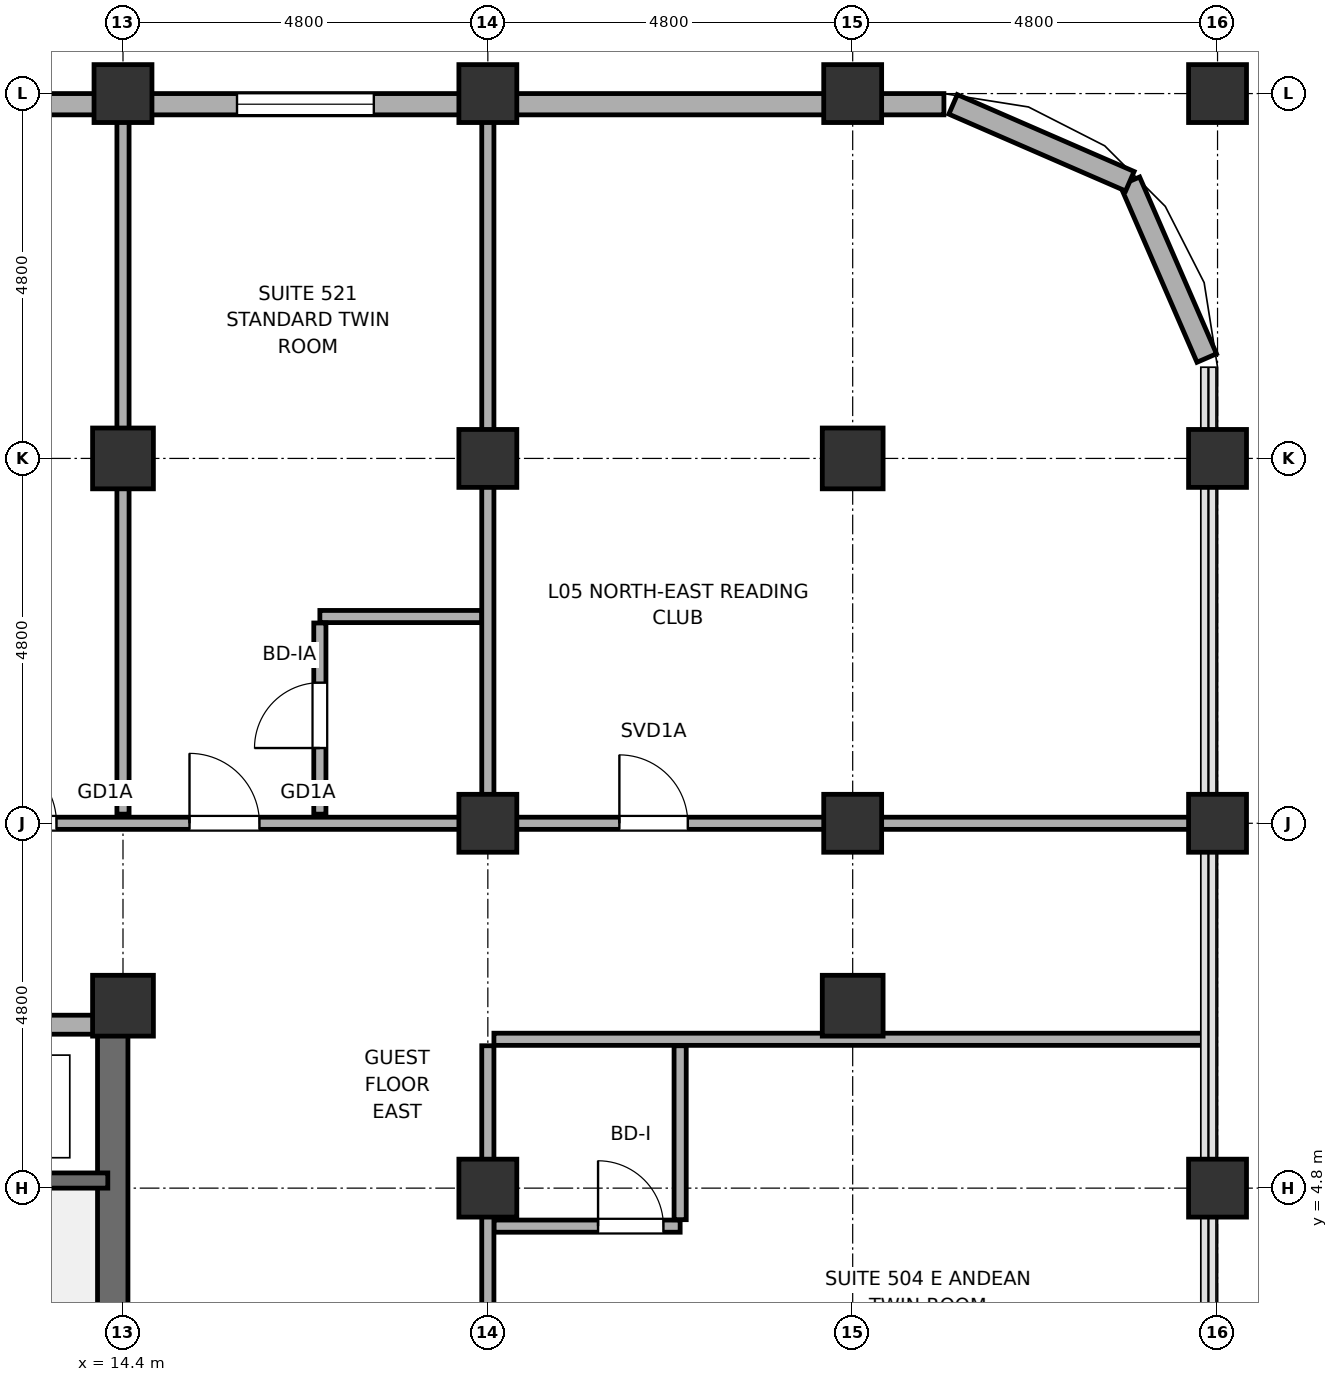
"""IFC4 building model, lengths in metres.
Left out: names, types, materials, properties, quantities, classifications, styles, units other than length and angle.
Written with IfcOpenShell. Run it as: python <this file> out.ifc"""

import sys

from ifc_helpers import new_model, si_unit, direction, frame, frame_2d, origin, origin_2d, place, context, subcontext, project, spatial, rectangle, hollow_rectangle, hollow_circle, extrude, element, fill, save


model = new_model("IFC4")
c1 = context("Model", 3, precision=1e-05, world=origin(), true_north=direction((0.0, 1.0)))
c2 = subcontext(c1, "Body", "Model", "MODEL_VIEW")
j1 = project(units=[si_unit("LENGTHUNIT", "METRE"), si_unit("PLANEANGLEUNIT", "RADIAN")], contexts=[c1])
p1 = place(None, origin())
s1 = spatial("IfcSite", under=j1, at=p1, CompositionType="ELEMENT")
p2 = place(p1, origin())
s2 = spatial("IfcBuilding", under=s1, at=p2, CompositionType="ELEMENT")
p3 = place(p2, frame((0.0, 0.0, 30.0)))
s3 = spatial("IfcBuildingStorey", under=s2, at=p3, CompositionType="ELEMENT", Elevation=30.0)
for number, where, z_axis, x_axis in (
    (1, (14.4, 7.2, 0.0), (0.0, 0.0, 1.0), (1.0, 0.0, 0.0)),
    (2, (14.4, 14.4, 0.0), (0.0, 0.0, 1.0), (1.0, 0.0, 0.0)),
):
    element("IfcColumn", number, at=place(p3, frame(where, z_axis=z_axis, x_axis=x_axis)), inside=s3, PredefinedType="COLUMN", context=c2, shape_type="SweptSolid", body=[
        extrude(hollow_rectangle(XDim=0.8, YDim=0.8, WallThickness=0.036, at=origin_2d()), origin(), (0.0, 0.0, 1.0), 3.7),
    ])
for number, where, z_axis, x_axis in (
    (3, (14.4, 19.2, 0.0), (0.0, 0.0, 1.0), (1.0, 0.0, 0.0)),
    (4, (19.2, 4.8, 0.0), (0.0, 0.0, 1.0), (1.0, 0.0, 0.0)),
    (5, (19.2, 9.6, 0.0), (0.0, 0.0, 1.0), (1.0, 0.0, 0.0)),
    (6, (19.2, 14.4, 0.0), (0.0, 0.0, 1.0), (1.0, 0.0, 0.0)),
    (7, (19.2, 19.2, 0.0), (0.0, 0.0, 1.0), (1.0, 0.0, 0.0)),
):
    element("IfcColumn", number, at=place(p3, frame(where, z_axis=z_axis, x_axis=x_axis)), inside=s3, PredefinedType="COLUMN", context=c2, shape_type="SweptSolid", body=[
        extrude(hollow_circle(Radius=0.381, WallThickness=0.032, at=origin_2d()), origin(), (0.0, 0.0, 1.0), 3.7),
    ])
p4 = place(p3, frame((24.0, 7.2, 0.0), z_axis=(0.0, 0.0, 1.0), x_axis=(1.0, 0.0, 0.0)))
e8 = element("IfcColumn", 8, at=p4, inside=s3, PredefinedType="COLUMN", context=c2, shape_type="SweptSolid", body=[
    extrude(hollow_rectangle(XDim=0.8, YDim=0.8, WallThickness=0.036, at=origin_2d()), origin(), (0.0, 0.0, 1.0), 3.7),
])
p5 = place(p3, frame((24.0, 9.6, 0.0), z_axis=(0.0, 0.0, 1.0), x_axis=(1.0, 0.0, 0.0)))
e9 = element("IfcColumn", 9, at=p5, inside=s3, PredefinedType="COLUMN", context=c2, shape_type="SweptSolid", body=[
    extrude(hollow_circle(Radius=0.381, WallThickness=0.032, at=origin_2d()), origin(), (0.0, 0.0, 1.0), 3.7),
])
p6 = place(p3, frame((24.0, 14.4, 0.0), z_axis=(0.0, 0.0, 1.0), x_axis=(1.0, 0.0, 0.0)))
e10 = element("IfcColumn", 10, at=p6, inside=s3, PredefinedType="COLUMN", context=c2, shape_type="SweptSolid", body=[
    extrude(hollow_rectangle(XDim=0.8, YDim=0.8, WallThickness=0.036, at=origin_2d()), origin(), (0.0, 0.0, 1.0), 3.7),
])
for number, where, z_axis, x_axis in (
    (11, (24.0, 19.2, 0.0), (0.0, 0.0, 1.0), (1.0, 0.0, 0.0)),
    (12, (28.8, 4.8, 0.0), (0.0, 0.0, 1.0), (1.0, 0.0, 0.0)),
    (13, (28.8, 9.6, 0.0), (0.0, 0.0, 1.0), (1.0, 0.0, 0.0)),
    (14, (28.8, 14.4, 0.0), (0.0, 0.0, 1.0), (1.0, 0.0, 0.0)),
    (15, (28.8, 19.2, 0.0), (0.0, 0.0, 1.0), (1.0, 0.0, 0.0)),
):
    element("IfcColumn", number, at=place(p3, frame(where, z_axis=z_axis, x_axis=x_axis)), inside=s3, PredefinedType="COLUMN", context=c2, shape_type="SweptSolid", body=[
        extrude(hollow_circle(Radius=0.381, WallThickness=0.032, at=origin_2d()), origin(), (0.0, 0.0, 1.0), 3.7),
    ])
p7 = place(p3, frame((14.265, -7.2, -0.18), z_axis=(0.0, 0.0, 1.0), x_axis=(0.0, 1.0, 0.0)))
e16 = element("IfcWall", 16, at=p7, inside=s3, PredefinedType="SHEAR", context=c2, shape_type="SweptSolid", body=[
    extrude(rectangle(XDim=14.4, YDim=0.4, at=frame_2d((7.2, 0.0))), origin(), (0.0, 0.0, 1.0), 3.7),
])
p8 = place(p3, frame((28.658, 15.721, 0.0), z_axis=(0.0, 0.0, 1.0), x_axis=(-0.398792985289, 0.917040977756, 0.0)))
e17 = element("IfcWall", 17, at=p8, inside=s3, PredefinedType="SOLIDWALL", context=c2, shape_type="SweptSolid", body=[
    extrude(rectangle(XDim=2.536, YDim=0.28, at=frame_2d((1.268, 0.0))), origin(), (0.0, 0.0, 1.0), 2.82),
])
p9 = place(p3, frame((27.646, 18.047, 0.0), z_axis=(0.0, 0.0, 1.0), x_axis=(-0.917060872934, 0.398747232384, 0.0)))
e18 = element("IfcWall", 18, at=p9, inside=s3, PredefinedType="SOLIDWALL", context=c2, shape_type="SweptSolid", body=[
    extrude(rectangle(XDim=2.536, YDim=0.28, at=frame_2d((1.268, 0.0))), origin(), (0.0, 0.0, 1.0), 2.12),
])
p10 = place(p3, frame((4.75, 19.06, 0.0), z_axis=(0.0, 0.0, 1.0), x_axis=(1.0, 0.0, 0.0)))
e19 = element("IfcWall", 19, at=p10, inside=s3, PredefinedType="SOLIDWALL", context=c2, shape_type="SweptSolid", body=[
    extrude(rectangle(XDim=20.45, YDim=0.28, at=frame_2d((10.225, 0.0))), origin(), (0.0, 0.0, 1.0), 2.12),
])
p11 = place(p10, frame((1.55, 0.0, 0.75)))
e20 = element("IfcOpeningElement", 20, at=p11, cuts=e19, PredefinedType="OPENING", context=c2, shape_type="SweptSolid", body=[
    extrude(rectangle(XDim=1.8, YDim=1.15, at=frame_2d((0.9, 0.575))), frame((0.0, 0.155, 0.0), z_axis=(0.0, -1.0, 0.0), x_axis=(1.0, 0.0, 0.0)), (0.0, 0.0, 1.0), 0.31),
])
p12 = place(p10, frame((6.35, 0.0, 0.75)))
e21 = element("IfcOpeningElement", 21, at=p12, cuts=e19, PredefinedType="OPENING", context=c2, shape_type="SweptSolid", body=[
    extrude(rectangle(XDim=1.8, YDim=1.15, at=frame_2d((0.9, 0.575))), frame((0.0, 0.155, 0.0), z_axis=(0.0, -1.0, 0.0), x_axis=(1.0, 0.0, 0.0)), (0.0, 0.0, 1.0), 0.31),
])
p13 = place(p10, frame((11.15, 0.0, 0.75)))
e22 = element("IfcOpeningElement", 22, at=p13, cuts=e19, PredefinedType="OPENING", context=c2, shape_type="SweptSolid", body=[
    extrude(rectangle(XDim=1.8, YDim=1.15, at=frame_2d((0.9, 0.575))), frame((0.0, 0.155, 0.0), z_axis=(0.0, -1.0, 0.0), x_axis=(1.0, 0.0, 0.0)), (0.0, 0.0, 1.0), 0.31),
])
p14 = place(p3, frame((4.8, 6.95, 0.0), z_axis=(0.0, 0.0, 1.0), x_axis=(1.0, 0.0, 0.0)))
e23 = element("IfcWall", 23, at=p14, inside=s3, PredefinedType="SOLIDWALL", context=c2, shape_type="SweptSolid", body=[
    extrude(rectangle(XDim=9.4, YDim=0.25, at=frame_2d((4.7, 0.0))), origin(), (0.0, 0.0, 1.0), 2.12),
])
p15 = place(p14, frame((3.5, 0.0, 0.0)))
e24 = element("IfcOpeningElement", 24, at=p15, cuts=e23, PredefinedType="OPENING", context=c2, shape_type="SweptSolid", body=[
    extrude(rectangle(XDim=1.2, YDim=2.02, at=frame_2d((0.6, 1.01))), frame((0.0, 0.14, 0.0), z_axis=(0.0, -1.0, 0.0), x_axis=(1.0, 0.0, 0.0)), (0.0, 0.0, 1.0), 0.28),
])
p16 = place(p3, frame((10.55, 4.9, -0.18), z_axis=(0.0, 0.0, 1.0), x_axis=(1.0, 0.0, 0.0)))
e25 = element("IfcWall", 25, at=p16, inside=s3, PredefinedType="SOLIDWALL", context=c2, shape_type="SweptSolid", body=[
    extrude(rectangle(XDim=3.65, YDim=0.2, at=frame_2d((1.825, 0.0))), origin(), (0.0, 0.0, 1.0), 3.7),
])
p17 = place(p3, frame((19.28, 4.3, 0.0), z_axis=(0.0, 0.0, 1.0), x_axis=(1.0, 0.0, 0.0)))
e26 = element("IfcWall", 26, at=p17, inside=s3, PredefinedType="PARTITIONING", context=c2, shape_type="SweptSolid", body=[
    extrude(rectangle(XDim=2.45, YDim=0.16, at=frame_2d((1.225, 0.0))), origin(), (0.0, 0.0, 1.0), 2.82),
])
p18 = place(p17, frame((1.37, 0.0, 0.0)))
e27 = element("IfcOpeningElement", 27, at=p18, cuts=e26, PredefinedType="OPENING", context=c2, shape_type="SweptSolid", body=[
    extrude(rectangle(XDim=0.86, YDim=2.1, at=frame_2d((0.43, 1.05))), frame((0.0, 0.095, 0.0), z_axis=(0.0, -1.0, 0.0), x_axis=(1.0, 0.0, 0.0)), (0.0, 0.0, 1.0), 0.19),
])
p19 = place(p3, frame((19.28, 6.758, 0.0), z_axis=(0.0, 0.0, 1.0), x_axis=(1.0, 0.0, 0.0)))
e28 = element("IfcWall", 28, at=p19, inside=s3, PredefinedType="PARTITIONING", context=c2, shape_type="SweptSolid", body=[
    extrude(rectangle(XDim=9.35, YDim=0.16, at=frame_2d((4.675, 0.0))), origin(), (0.0, 0.0, 1.0), 2.12),
])
p20 = place(p3, frame((-33.43, 9.6, 0.0), z_axis=(0.0, 0.0, 1.0), x_axis=(1.0, 0.0, 0.0)))
e29 = element("IfcWall", 29, at=p20, inside=s3, PredefinedType="PARTITIONING", context=c2, shape_type="SweptSolid", body=[
    extrude(rectangle(XDim=62.06, YDim=0.16, at=frame_2d((31.03, 0.0))), origin(), (0.0, 0.0, 1.0), 2.12),
])
p21 = place(p20, frame((6.8, 0.0, 0.0)))
e30 = element("IfcOpeningElement", 30, at=p21, cuts=e29, PredefinedType="OPENING", context=c2, shape_type="SweptSolid", body=[
    extrude(rectangle(XDim=0.9, YDim=2.02, at=frame_2d((0.45, 1.01))), frame((0.0, 0.095, 0.0), z_axis=(0.0, -1.0, 0.0), x_axis=(1.0, 0.0, 0.0)), (0.0, 0.0, 1.0), 0.19),
])
p22 = place(p20, frame((54.361, 0.0, 0.0)))
e31 = element("IfcOpeningElement", 31, at=p22, cuts=e29, PredefinedType="OPENING", context=c2, shape_type="SweptSolid", body=[
    extrude(rectangle(XDim=0.9, YDim=2.02, at=frame_2d((0.45, 1.01))), frame((0.0, 0.095, 0.0), z_axis=(0.0, -1.0, 0.0), x_axis=(1.0, 0.0, 0.0)), (0.0, 0.0, 1.0), 0.19),
])
p23 = place(p20, frame((10.69, 0.0, 0.0)))
e32 = element("IfcOpeningElement", 32, at=p23, cuts=e29, PredefinedType="OPENING", context=c2, shape_type="SweptSolid", body=[
    extrude(rectangle(XDim=0.9, YDim=2.02, at=frame_2d((0.45, 1.01))), frame((0.0, 0.095, 0.0), z_axis=(0.0, -1.0, 0.0), x_axis=(1.0, 0.0, 0.0)), (0.0, 0.0, 1.0), 0.19),
])
p24 = place(p20, frame((12.07, 0.0, 0.0)))
e33 = element("IfcOpeningElement", 33, at=p24, cuts=e29, PredefinedType="OPENING", context=c2, shape_type="SweptSolid", body=[
    extrude(rectangle(XDim=0.9, YDim=2.02, at=frame_2d((0.45, 1.01))), frame((0.0, 0.095, 0.0), z_axis=(0.0, -1.0, 0.0), x_axis=(1.0, 0.0, 0.0)), (0.0, 0.0, 1.0), 0.19),
])
p25 = place(p20, frame((17.235, 0.0, 0.0)))
e34 = element("IfcOpeningElement", 34, at=p25, cuts=e29, PredefinedType="OPENING", context=c2, shape_type="SweptSolid", body=[
    extrude(rectangle(XDim=0.92, YDim=2.02, at=frame_2d((0.46, 1.01))), frame((0.0, 0.095, 0.0), z_axis=(0.0, -1.0, 0.0), x_axis=(1.0, 0.0, 0.0)), (0.0, 0.0, 1.0), 0.19),
])
p26 = place(p20, frame((19.905, 0.0, 0.0)))
e35 = element("IfcOpeningElement", 35, at=p26, cuts=e29, PredefinedType="OPENING", context=c2, shape_type="SweptSolid", body=[
    extrude(rectangle(XDim=0.92, YDim=2.02, at=frame_2d((0.46, 1.01))), frame((0.0, 0.095, 0.0), z_axis=(0.0, -1.0, 0.0), x_axis=(1.0, 0.0, 0.0)), (0.0, 0.0, 1.0), 0.19),
])
p27 = place(p20, frame((26.835, 0.0, 0.0)))
e36 = element("IfcOpeningElement", 36, at=p27, cuts=e29, PredefinedType="OPENING", context=c2, shape_type="SweptSolid", body=[
    extrude(rectangle(XDim=0.92, YDim=2.02, at=frame_2d((0.46, 1.01))), frame((0.0, 0.095, 0.0), z_axis=(0.0, -1.0, 0.0), x_axis=(1.0, 0.0, 0.0)), (0.0, 0.0, 1.0), 0.19),
])
p28 = place(p20, frame((29.505, 0.0, 0.0)))
e37 = element("IfcOpeningElement", 37, at=p28, cuts=e29, PredefinedType="OPENING", context=c2, shape_type="SweptSolid", body=[
    extrude(rectangle(XDim=0.92, YDim=2.02, at=frame_2d((0.46, 1.01))), frame((0.0, 0.095, 0.0), z_axis=(0.0, -1.0, 0.0), x_axis=(1.0, 0.0, 0.0)), (0.0, 0.0, 1.0), 0.19),
])
p29 = place(p20, frame((36.435, 0.0, 0.0)))
e38 = element("IfcOpeningElement", 38, at=p29, cuts=e29, PredefinedType="OPENING", context=c2, shape_type="SweptSolid", body=[
    extrude(rectangle(XDim=0.92, YDim=2.02, at=frame_2d((0.46, 1.01))), frame((0.0, 0.095, 0.0), z_axis=(0.0, -1.0, 0.0), x_axis=(1.0, 0.0, 0.0)), (0.0, 0.0, 1.0), 0.19),
])
p30 = place(p20, frame((39.105, 0.0, 0.0)))
e39 = element("IfcOpeningElement", 39, at=p30, cuts=e29, PredefinedType="OPENING", context=c2, shape_type="SweptSolid", body=[
    extrude(rectangle(XDim=0.92, YDim=2.02, at=frame_2d((0.46, 1.01))), frame((0.0, 0.095, 0.0), z_axis=(0.0, -1.0, 0.0), x_axis=(1.0, 0.0, 0.0)), (0.0, 0.0, 1.0), 0.19),
])
p31 = place(p20, frame((46.035, 0.0, 0.0)))
e40 = element("IfcOpeningElement", 40, at=p31, cuts=e29, PredefinedType="OPENING", context=c2, shape_type="SweptSolid", body=[
    extrude(rectangle(XDim=0.92, YDim=2.02, at=frame_2d((0.46, 1.01))), frame((0.0, 0.095, 0.0), z_axis=(0.0, -1.0, 0.0), x_axis=(1.0, 0.0, 0.0)), (0.0, 0.0, 1.0), 0.19),
])
p32 = place(p20, frame((48.705, 0.0, 0.0)))
e41 = element("IfcOpeningElement", 41, at=p32, cuts=e29, PredefinedType="OPENING", context=c2, shape_type="SweptSolid", body=[
    extrude(rectangle(XDim=0.92, YDim=2.02, at=frame_2d((0.46, 1.01))), frame((0.0, 0.095, 0.0), z_axis=(0.0, -1.0, 0.0), x_axis=(1.0, 0.0, 0.0)), (0.0, 0.0, 1.0), 0.19),
])
p33 = place(p3, frame((16.99, 12.32, 0.0), z_axis=(0.0, 0.0, 1.0), x_axis=(1.0, 0.0, 0.0)))
e42 = element("IfcWall", 42, at=p33, inside=s3, PredefinedType="PARTITIONING", context=c2, shape_type="SweptSolid", body=[
    extrude(rectangle(XDim=2.13, YDim=0.16, at=frame_2d((1.065, 0.0))), origin(), (0.0, 0.0, 1.0), 2.82),
])
p34 = place(p3, frame((14.4, 9.72, 0.0), z_axis=(0.0, 0.0, 1.0), x_axis=(0.0, 1.0, 0.0)))
e43 = element("IfcWall", 43, at=p34, inside=s3, PredefinedType="PARTITIONING", context=c2, shape_type="SweptSolid", body=[
    extrude(rectangle(XDim=9.19, YDim=0.16, at=frame_2d((4.595, 0.0))), origin(), (0.0, 0.0, 1.0), 2.12),
])
p35 = place(p3, frame((16.99, 9.72, 0.0), z_axis=(0.0, 0.0, 1.0), x_axis=(0.0, 1.0, 0.0)))
e44 = element("IfcWall", 44, at=p35, inside=s3, PredefinedType="PARTITIONING", context=c2, shape_type="SweptSolid", body=[
    extrude(rectangle(XDim=2.515, YDim=0.16, at=frame_2d((1.258, 0.0))), origin(), (0.0, 0.0, 1.0), 2.12),
])
p36 = place(p35, frame((0.87, 0.0, 0.0)))
e45 = element("IfcOpeningElement", 45, at=p36, cuts=e44, PredefinedType="OPENING", context=c2, shape_type="SweptSolid", body=[
    extrude(rectangle(XDim=0.86, YDim=2.02, at=frame_2d((0.43, 1.01))), frame((0.0, 0.095, 0.0), z_axis=(0.0, -1.0, 0.0), x_axis=(1.0, 0.0, 0.0)), (0.0, 0.0, 1.0), 0.19),
])
p37 = place(p3, frame((19.2, -6.715, 0.0), z_axis=(0.0, 0.0, 1.0), x_axis=(0.0, 1.0, 0.0)))
e46 = element("IfcWall", 46, at=p37, inside=s3, PredefinedType="PARTITIONING", context=c2, shape_type="SweptSolid", body=[
    extrude(rectangle(XDim=13.388, YDim=0.16, at=frame_2d((6.694, 0.0))), origin(), (0.0, 0.0, 1.0), 2.12),
])
p38 = place(p37, frame((3.035, 0.0, 0.0)))
e47 = element("IfcOpeningElement", 47, at=p38, cuts=e46, PredefinedType="OPENING", context=c2, shape_type="SweptSolid", body=[
    extrude(rectangle(XDim=0.92, YDim=2.02, at=frame_2d((0.46, 1.01))), frame((0.0, 0.095, 0.0), z_axis=(0.0, -1.0, 0.0), x_axis=(1.0, 0.0, 0.0)), (0.0, 0.0, 1.0), 0.19),
])
p39 = place(p37, frame((8.385, 0.0, 0.0)))
e48 = element("IfcOpeningElement", 48, at=p39, cuts=e46, PredefinedType="OPENING", context=c2, shape_type="SweptSolid", body=[
    extrude(rectangle(XDim=0.92, YDim=2.02, at=frame_2d((0.46, 1.01))), frame((0.0, 0.095, 0.0), z_axis=(0.0, -1.0, 0.0), x_axis=(1.0, 0.0, 0.0)), (0.0, 0.0, 1.0), 0.19),
])
p40 = place(p3, frame((19.2, 9.72, 0.0), z_axis=(0.0, 0.0, 1.0), x_axis=(0.0, 1.0, 0.0)))
e49 = element("IfcWall", 49, at=p40, inside=s3, PredefinedType="PARTITIONING", context=c2, shape_type="SweptSolid", body=[
    extrude(rectangle(XDim=9.19, YDim=0.16, at=frame_2d((4.595, 0.0))), origin(), (0.0, 0.0, 1.0), 2.12),
])
p41 = place(p3, frame((21.73, 4.385, 0.0), z_axis=(0.0, 0.0, 1.0), x_axis=(0.0, 1.0, 0.0)))
e50 = element("IfcWall", 50, at=p41, inside=s3, PredefinedType="PARTITIONING", context=c2, shape_type="SweptSolid", body=[
    extrude(rectangle(XDim=2.288, YDim=0.16, at=frame_2d((1.144, 0.0))), origin(), (0.0, 0.0, 1.0), 3.52),
])
p42 = place(p13, origin())
e51 = element("IfcWindow", 51, at=p42, inside=s3, PartitioningType="SINGLE_PANEL", PredefinedType="WINDOW", context=c2, shape_type="SweptSolid", body=[
    extrude(rectangle(XDim=1.8, YDim=1.15, at=frame_2d((0.9, 0.575))), frame((0.0, 0.03, 0.0), z_axis=(0.0, -1.0, 0.0), x_axis=(1.0, 0.0, 0.0)), (0.0, 0.0, 1.0), 0.06),
])
fill(e22, e51)
p43 = place(p22, origin())
e52 = element("IfcDoor", 52, at=p43, inside=s3, OperationType="SINGLE_SWING_LEFT", PredefinedType="DOOR", context=c2, shape_type="SweptSolid", body=[
    extrude(rectangle(XDim=0.9, YDim=2.02, at=frame_2d((0.45, 1.01))), frame((0.0, 0.025, 0.0), z_axis=(0.0, -1.0, 0.0), x_axis=(1.0, 0.0, 0.0)), (0.0, 0.0, 1.0), 0.05),
])
fill(e31, e52)
p44 = place(p18, origin())
e53 = element("IfcDoor", 53, at=p44, inside=s3, OperationType="SINGLE_SWING_RIGHT", PredefinedType="DOOR", context=c2, shape_type="SweptSolid", body=[
    extrude(rectangle(XDim=0.86, YDim=2.1, at=frame_2d((0.43, 1.05))), frame((0.0, 0.025, 0.0), z_axis=(0.0, -1.0, 0.0), x_axis=(1.0, 0.0, 0.0)), (0.0, 0.0, 1.0), 0.05),
])
fill(e27, e53)
p45 = place(p31, origin())
e54 = element("IfcDoor", 54, at=p45, inside=s3, OperationType="SINGLE_SWING_RIGHT", PredefinedType="DOOR", context=c2, shape_type="SweptSolid", body=[
    extrude(rectangle(XDim=0.92, YDim=2.02, at=frame_2d((0.46, 1.01))), frame((0.0, 0.025, 0.0), z_axis=(0.0, -1.0, 0.0), x_axis=(1.0, 0.0, 0.0)), (0.0, 0.0, 1.0), 0.05),
])
fill(e40, e54)
p46 = place(p32, origin())
e55 = element("IfcDoor", 55, at=p46, inside=s3, OperationType="SINGLE_SWING_LEFT", PredefinedType="DOOR", context=c2, shape_type="SweptSolid", body=[
    extrude(rectangle(XDim=0.92, YDim=2.02, at=frame_2d((0.46, 1.01))), frame((0.0, 0.025, 0.0), z_axis=(0.0, -1.0, 0.0), x_axis=(1.0, 0.0, 0.0)), (0.0, 0.0, 1.0), 0.05),
])
fill(e41, e55)
p47 = place(p36, origin())
e56 = element("IfcDoor", 56, at=p47, inside=s3, OperationType="SINGLE_SWING_RIGHT", PredefinedType="DOOR", context=c2, shape_type="SweptSolid", body=[
    extrude(rectangle(XDim=0.86, YDim=2.02, at=frame_2d((0.43, 1.01))), frame((0.0, 0.025, 0.0), z_axis=(0.0, -1.0, 0.0), x_axis=(1.0, 0.0, 0.0)), (0.0, 0.0, 1.0), 0.05),
])
fill(e45, e56)
save(model, sys.argv[1])
